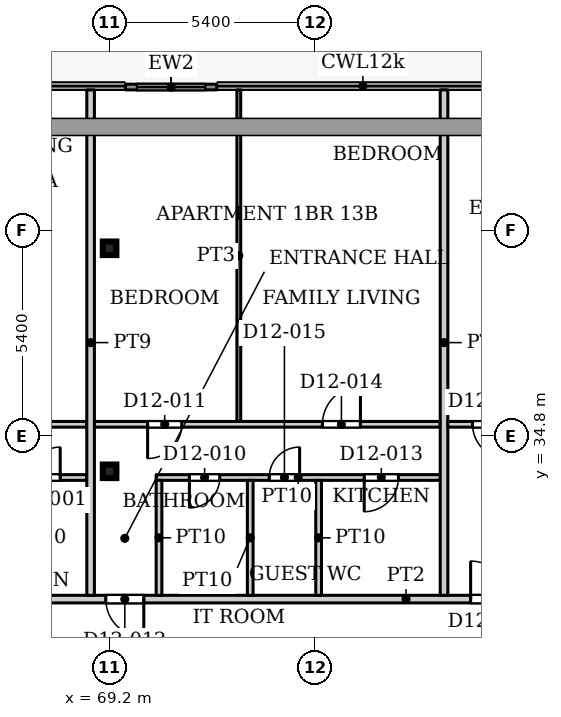
"""IFC4 building model, lengths in metres.
Left out: names, types, materials, properties, quantities, classifications, styles, units other than length and angle.
Written with IfcOpenShell. Run it as: python <this file> out.ifc"""

import sys

from ifc_helpers import new_model, si_unit, direction, frame, frame_2d, origin, origin_2d, place, context, subcontext, project, spatial, rectangle, hollow_rectangle, extrude, source, transform, mapped, element, fill, save


model = new_model("IFC4")
c1 = context("Model", 3, precision=1e-05, world=origin(), true_north=direction((0.0, 1.0)))
c2 = subcontext(c1, "Body", "Model", "MODEL_VIEW")
j1 = project(units=[si_unit("LENGTHUNIT", "METRE"), si_unit("PLANEANGLEUNIT", "RADIAN")], contexts=[c1])
p1 = place(None, origin())
s1 = spatial("IfcSite", under=j1, at=p1, CompositionType="ELEMENT")
p2 = place(p1, origin())
s2 = spatial("IfcBuilding", under=s1, at=p2, CompositionType="ELEMENT")
p3 = place(p2, frame((0.0, 0.0, 57.8)))
s3 = spatial("IfcBuildingStorey", under=s2, at=p3, CompositionType="ELEMENT", Elevation=57.8)
for number, where, z_axis, x_axis in (
    (1, (69.2, 33.863, 0.0), (0.0, 0.0, 1.0), (1.0, 0.0, 0.0)),
    (2, (69.2, 39.732, 0.0), (0.0, 0.0, 1.0), (1.0, 0.0, 0.0)),
):
    element("IfcColumn", number, at=place(p3, frame(where, z_axis=z_axis, x_axis=x_axis)), inside=s3, PredefinedType="COLUMN", context=c2, shape_type="SweptSolid", body=[
        extrude(hollow_rectangle(XDim=0.356, YDim=0.356, WallThickness=0.016, InnerFilletRadius=0.016, OuterFilletRadius=0.032, at=origin_2d()), origin(), (0.0, 0.0, 1.0), 3.9),
    ])
p4 = place(p3, frame((69.618, 43.975, 0.0), z_axis=(0.0, 0.0, 1.0), x_axis=(1.0, 0.0, 0.0)))
e3 = element("IfcWall", 3, at=p4, inside=s3, PredefinedType="SOLIDWALL", context=c2, shape_type="SweptSolid", body=[
    extrude(rectangle(XDim=2.4, YDim=0.15, at=frame_2d((1.2, 0.0))), origin(), (0.0, 0.0, 1.0), 3.75),
])
p5 = place(p4, frame((0.3, 0.0, 0.0)))
e4 = element("IfcOpeningElement", 4, at=p5, cuts=e3, PredefinedType="OPENING", context=c2, shape_type="SweptSolid", body=[
    extrude(rectangle(XDim=1.8, YDim=2.4, at=frame_2d((0.9, 1.2))), frame((0.0, 0.085, 0.0), z_axis=(0.0, -1.0, 0.0), x_axis=(1.0, 0.0, 0.0)), (0.0, 0.0, 1.0), 0.17),
])
p6 = place(p3, frame((55.9, 30.5, 0.0), z_axis=(0.0, 0.0, 1.0), x_axis=(1.0, 0.0, 0.0)))
e5 = element("IfcWall", 5, at=p6, inside=s3, PredefinedType="PARTITIONING", context=c2, shape_type="SweptSolid", body=[
    extrude(rectangle(XDim=42.2, YDim=0.2, at=frame_2d((21.1, 0.0))), origin(), (0.0, 0.0, 1.0), 3.6),
])
p7 = place(p6, frame((0.6, 0.0, 0.0)))
e6 = element("IfcOpeningElement", 6, at=p7, cuts=e5, PredefinedType="OPENING", context=c2, shape_type="SweptSolid", body=[
    extrude(rectangle(XDim=1.0, YDim=2.1, at=frame_2d((0.5, 1.05))), frame((0.0, 0.11, 0.0), z_axis=(0.0, -1.0, 0.0), x_axis=(1.0, 0.0, 0.0)), (0.0, 0.0, 1.0), 0.22),
])
p8 = place(p6, frame((13.2, 0.0, 0.0)))
e7 = element("IfcOpeningElement", 7, at=p8, cuts=e5, PredefinedType="OPENING", context=c2, shape_type="SweptSolid", body=[
    extrude(rectangle(XDim=1.0, YDim=2.1, at=frame_2d((0.5, 1.05))), frame((0.0, 0.11, 0.0), z_axis=(0.0, -1.0, 0.0), x_axis=(1.0, 0.0, 0.0)), (0.0, 0.0, 1.0), 0.22),
])
p9 = place(p6, frame((22.8, 0.0, 0.0)))
e8 = element("IfcOpeningElement", 8, at=p9, cuts=e5, PredefinedType="OPENING", context=c2, shape_type="SweptSolid", body=[
    extrude(rectangle(XDim=1.0, YDim=2.1, at=frame_2d((0.5, 1.05))), frame((0.0, 0.11, 0.0), z_axis=(0.0, -1.0, 0.0), x_axis=(1.0, 0.0, 0.0)), (0.0, 0.0, 1.0), 0.22),
])
p10 = place(p6, frame((34.65, 0.0, 0.0)))
e9 = element("IfcOpeningElement", 9, at=p10, cuts=e5, PredefinedType="OPENING", context=c2, shape_type="SweptSolid", body=[
    extrude(rectangle(XDim=1.0, YDim=2.1, at=frame_2d((0.5, 1.05))), frame((0.0, 0.11, 0.0), z_axis=(0.0, -1.0, 0.0), x_axis=(1.0, 0.0, 0.0)), (0.0, 0.0, 1.0), 0.22),
])
p11 = place(p3, frame((55.9, 35.1, 0.0), z_axis=(0.0, 0.0, 1.0), x_axis=(1.0, 0.0, 0.0)))
e10 = element("IfcWall", 10, at=p11, inside=s3, PredefinedType="PARTITIONING", context=c2, shape_type="SweptSolid", body=[
    extrude(rectangle(XDim=12.7, YDim=0.15, at=frame_2d((6.35, 0.0))), origin(), (0.0, 0.0, 1.0), 3.6),
])
p12 = place(p11, frame((1.25, 0.0, 0.0)))
e11 = element("IfcOpeningElement", 11, at=p12, cuts=e10, PredefinedType="OPENING", context=c2, shape_type="SweptSolid", body=[
    extrude(rectangle(XDim=0.9, YDim=2.1, at=frame_2d((0.45, 1.05))), frame((0.0, 0.085, 0.0), z_axis=(0.0, -1.0, 0.0), x_axis=(1.0, 0.0, 0.0)), (0.0, 0.0, 1.0), 0.17),
])
p13 = place(p11, frame((9.75, 0.0, 0.0)))
e12 = element("IfcOpeningElement", 12, at=p13, cuts=e10, PredefinedType="OPENING", context=c2, shape_type="SweptSolid", body=[
    extrude(rectangle(XDim=1.0, YDim=2.1, at=frame_2d((0.5, 1.05))), frame((0.0, 0.085, 0.0), z_axis=(0.0, -1.0, 0.0), x_axis=(1.0, 0.0, 0.0)), (0.0, 0.0, 1.0), 0.17),
])
p14 = place(p11, frame((4.1, 0.0, 0.0)))
e13 = element("IfcOpeningElement", 13, at=p14, cuts=e10, PredefinedType="OPENING", context=c2, shape_type="SweptSolid", body=[
    extrude(rectangle(XDim=0.9, YDim=2.1, at=frame_2d((0.45, 1.05))), frame((0.0, 0.085, 0.0), z_axis=(0.0, -1.0, 0.0), x_axis=(1.0, 0.0, 0.0)), (0.0, 0.0, 1.0), 0.17),
])
p15 = place(p3, frame((58.15, 33.7, 0.0), z_axis=(0.0, 0.0, 1.0), x_axis=(1.0, 0.0, 0.0)))
e14 = element("IfcWall", 14, at=p15, inside=s3, PredefinedType="PARTITIONING", context=c2, shape_type="SweptSolid", body=[
    extrude(rectangle(XDim=10.45, YDim=0.15, at=frame_2d((5.225, 0.0))), origin(), (0.0, 0.0, 1.0), 3.6),
])
p16 = place(p15, frame((8.95, 0.0, 0.0)))
e15 = element("IfcOpeningElement", 15, at=p16, cuts=e14, PredefinedType="OPENING", context=c2, shape_type="SweptSolid", body=[
    extrude(rectangle(XDim=0.8, YDim=2.1, at=frame_2d((0.4, 1.05))), frame((0.0, 0.085, 0.0), z_axis=(0.0, -1.0, 0.0), x_axis=(1.0, 0.0, 0.0)), (0.0, 0.0, 1.0), 0.17),
])
p17 = place(p15, frame((6.55, 0.0, 0.0)))
e16 = element("IfcOpeningElement", 16, at=p17, cuts=e14, PredefinedType="OPENING", context=c2, shape_type="SweptSolid", body=[
    extrude(rectangle(XDim=0.8, YDim=2.1, at=frame_2d((0.4, 1.05))), frame((0.0, 0.085, 0.0), z_axis=(0.0, -1.0, 0.0), x_axis=(1.0, 0.0, 0.0)), (0.0, 0.0, 1.0), 0.17),
])
p18 = place(p15, frame((1.55, 0.0, 0.0)))
e17 = element("IfcOpeningElement", 17, at=p18, cuts=e14, PredefinedType="OPENING", context=c2, shape_type="SweptSolid", body=[
    extrude(rectangle(XDim=0.9, YDim=2.1, at=frame_2d((0.45, 1.05))), frame((0.0, 0.085, 0.0), z_axis=(0.0, -1.0, 0.0), x_axis=(1.0, 0.0, 0.0)), (0.0, 0.0, 1.0), 0.17),
])
p19 = place(p15, frame((4.45, 0.0, 0.0)))
e18 = element("IfcOpeningElement", 18, at=p19, cuts=e14, PredefinedType="OPENING", context=c2, shape_type="SweptSolid", body=[
    extrude(rectangle(XDim=0.8, YDim=2.1, at=frame_2d((0.4, 1.05))), frame((0.0, 0.085, 0.0), z_axis=(0.0, -1.0, 0.0), x_axis=(1.0, 0.0, 0.0)), (0.0, 0.0, 1.0), 0.17),
])
p20 = place(p3, frame((68.7, 30.6, 0.0), z_axis=(0.0, 0.0, 1.0), x_axis=(0.0, 1.0, 0.0)))
e19 = element("IfcWall", 19, at=p20, inside=s3, PredefinedType="PARTITIONING", context=c2, shape_type="SweptSolid", body=[
    extrude(rectangle(XDim=13.3, YDim=0.2, at=frame_2d((6.65, 0.0))), origin(), (0.0, 0.0, 1.0), 3.6),
])
p21 = place(p3, frame((68.8, 35.1, 0.0), z_axis=(0.0, 0.0, 1.0), x_axis=(1.0, 0.0, 0.0)))
e20 = element("IfcWall", 20, at=p21, inside=s3, PredefinedType="PARTITIONING", context=c2, shape_type="SweptSolid", body=[
    extrude(rectangle(XDim=9.1, YDim=0.15, at=frame_2d((4.55, 0.0))), origin(), (0.0, 0.0, 1.0), 3.6),
])
p22 = place(p21, frame((1.4, 0.0, 0.0)))
e21 = element("IfcOpeningElement", 21, at=p22, cuts=e20, PredefinedType="OPENING", context=c2, shape_type="SweptSolid", body=[
    extrude(rectangle(XDim=0.9, YDim=2.1, at=frame_2d((0.45, 1.05))), frame((0.0, 0.085, 0.0), z_axis=(0.0, -1.0, 0.0), x_axis=(1.0, 0.0, 0.0)), (0.0, 0.0, 1.0), 0.17),
])
p23 = place(p21, frame((6.0, 0.0, 0.0)))
e22 = element("IfcOpeningElement", 22, at=p23, cuts=e20, PredefinedType="OPENING", context=c2, shape_type="SweptSolid", body=[
    extrude(rectangle(XDim=1.0, YDim=2.1, at=frame_2d((0.5, 1.05))), frame((0.0, 0.085, 0.0), z_axis=(0.0, -1.0, 0.0), x_axis=(1.0, 0.0, 0.0)), (0.0, 0.0, 1.0), 0.17),
])
p24 = place(p3, frame((70.425, 33.7, 0.0), z_axis=(0.0, 0.0, 1.0), x_axis=(1.0, 0.0, 0.0)))
e23 = element("IfcWall", 23, at=p24, inside=s3, PredefinedType="PARTITIONING", context=c2, shape_type="SweptSolid", body=[
    extrude(rectangle(XDim=7.475, YDim=0.15, at=frame_2d((3.737, 0.0))), origin(), (0.0, 0.0, 1.0), 3.6),
])
p25 = place(p24, frame((0.875, 0.0, 0.0)))
e24 = element("IfcOpeningElement", 24, at=p25, cuts=e23, PredefinedType="OPENING", context=c2, shape_type="SweptSolid", body=[
    extrude(rectangle(XDim=0.8, YDim=2.1, at=frame_2d((0.4, 1.05))), frame((0.0, 0.085, 0.0), z_axis=(0.0, -1.0, 0.0), x_axis=(1.0, 0.0, 0.0)), (0.0, 0.0, 1.0), 0.17),
])
p26 = place(p24, frame((5.475, 0.0, 0.0)))
e25 = element("IfcOpeningElement", 25, at=p26, cuts=e23, PredefinedType="OPENING", context=c2, shape_type="SweptSolid", body=[
    extrude(rectangle(XDim=0.9, YDim=2.1, at=frame_2d((0.45, 1.05))), frame((0.0, 0.085, 0.0), z_axis=(0.0, -1.0, 0.0), x_axis=(1.0, 0.0, 0.0)), (0.0, 0.0, 1.0), 0.17),
])
p27 = place(p24, frame((2.975, 0.0, 0.0)))
e26 = element("IfcOpeningElement", 26, at=p27, cuts=e23, PredefinedType="OPENING", context=c2, shape_type="SweptSolid", body=[
    extrude(rectangle(XDim=0.8, YDim=2.1, at=frame_2d((0.4, 1.05))), frame((0.0, 0.085, 0.0), z_axis=(0.0, -1.0, 0.0), x_axis=(1.0, 0.0, 0.0)), (0.0, 0.0, 1.0), 0.17),
])
p28 = place(p3, frame((70.5, 30.6, 0.0), z_axis=(0.0, 0.0, 1.0), x_axis=(0.0, 1.0, 0.0)))
e27 = element("IfcWall", 27, at=p28, inside=s3, PredefinedType="PARTITIONING", context=c2, shape_type="SweptSolid", body=[
    extrude(rectangle(XDim=3.025, YDim=0.15, at=frame_2d((1.512, 0.0))), origin(), (0.0, 0.0, 1.0), 3.6),
])
p29 = place(p3, frame((72.6, 35.175, 0.0), z_axis=(0.0, 0.0, 1.0), x_axis=(0.0, 1.0, 0.0)))
e28 = element("IfcWall", 28, at=p29, inside=s3, PredefinedType="PARTITIONING", context=c2, shape_type="SweptSolid", body=[
    extrude(rectangle(XDim=8.725, YDim=0.1, at=frame_2d((4.362, 0.0))), origin(), (0.0, 0.0, 1.0), 3.6),
])
for number, where, z_axis, x_axis in (
    (29, (72.9, 30.6, 0.0), (0.0, 0.0, 1.0), (0.0, 1.0, 0.0)),
    (30, (74.7, 30.6, 0.0), (0.0, 0.0, 1.0), (0.0, 1.0, 0.0)),
):
    element("IfcWall", number, at=place(p3, frame(where, z_axis=z_axis, x_axis=x_axis)), inside=s3, PredefinedType="PARTITIONING", context=c2, shape_type="SweptSolid", body=[
        extrude(rectangle(XDim=3.025, YDim=0.15, at=frame_2d((1.512, 0.0))), origin(), (0.0, 0.0, 1.0), 3.6),
    ])
p30 = place(p3, frame((78.0, 30.6, 0.0), z_axis=(0.0, 0.0, 1.0), x_axis=(0.0, 1.0, 0.0)))
e31 = element("IfcWall", 31, at=p30, inside=s3, PredefinedType="PARTITIONING", context=c2, shape_type="SweptSolid", body=[
    extrude(rectangle(XDim=13.3, YDim=0.2, at=frame_2d((6.65, 0.0))), origin(), (0.0, 0.0, 1.0), 3.6),
])
p31 = place(p3, frame((78.1, 35.1, 0.0), z_axis=(0.0, 0.0, 1.0), x_axis=(1.0, 0.0, 0.0)))
e32 = element("IfcWall", 32, at=p31, inside=s3, PredefinedType="PARTITIONING", context=c2, shape_type="SweptSolid", body=[
    extrude(rectangle(XDim=11.8, YDim=0.15, at=frame_2d((5.9, 0.0))), origin(), (0.0, 0.0, 1.0), 3.6),
])
p32 = place(p31, frame((0.65, 0.0, 0.0)))
e33 = element("IfcOpeningElement", 33, at=p32, cuts=e32, PredefinedType="OPENING", context=c2, shape_type="SweptSolid", body=[
    extrude(rectangle(XDim=0.9, YDim=2.1, at=frame_2d((0.45, 1.05))), frame((0.0, 0.085, 0.0), z_axis=(0.0, -1.0, 0.0), x_axis=(1.0, 0.0, 0.0)), (0.0, 0.0, 1.0), 0.17),
])
p33 = place(p31, frame((8.85, 0.0, 0.0)))
e34 = element("IfcOpeningElement", 34, at=p33, cuts=e32, PredefinedType="OPENING", context=c2, shape_type="SweptSolid", body=[
    extrude(rectangle(XDim=1.0, YDim=2.1, at=frame_2d((0.5, 1.05))), frame((0.0, 0.085, 0.0), z_axis=(0.0, -1.0, 0.0), x_axis=(1.0, 0.0, 0.0)), (0.0, 0.0, 1.0), 0.17),
])
p34 = place(p31, frame((5.15, 0.0, 0.0)))
e35 = element("IfcOpeningElement", 35, at=p34, cuts=e32, PredefinedType="OPENING", context=c2, shape_type="SweptSolid", body=[
    extrude(rectangle(XDim=0.9, YDim=2.1, at=frame_2d((0.45, 1.05))), frame((0.0, 0.085, 0.0), z_axis=(0.0, -1.0, 0.0), x_axis=(1.0, 0.0, 0.0)), (0.0, 0.0, 1.0), 0.17),
])
m1 = source(origin(), c2, "Body", "SweptSolid", [
    extrude(rectangle(XDim=1.8, YDim=2.4, at=frame_2d((0.9, 1.2))), frame((0.0, 0.025, 0.0), z_axis=(0.0, -1.0, 0.0), x_axis=(1.0, 0.0, 0.0)), (0.0, 0.0, 1.0), 0.05),
])
p35 = place(p5, origin())
e36 = element("IfcDoor", 36, at=p35, inside=s3, OperationType="SLIDING_TO_LEFT", PredefinedType="DOOR", context=c2, shape_type="MappedRepresentation", body=[
    mapped(m1, transform((0.0, 0.0, 0.0), x_axis=(1.0, 0.0, 0.0), y_axis=(0.0, 1.0, 0.0), z_axis=(0.0, 0.0, 1.0), scale=1.0)),
])
fill(e4, e36)
m2 = source(origin(), c2, "Body", "SweptSolid", [
    extrude(rectangle(XDim=0.8, YDim=2.1, at=frame_2d((0.4, 1.05))), frame((0.0, 0.025, 0.0), z_axis=(0.0, -1.0, 0.0), x_axis=(1.0, 0.0, 0.0)), (0.0, 0.0, 1.0), 0.05),
])
p36 = place(p16, origin())
e37 = element("IfcDoor", 37, at=p36, inside=s3, OperationType="SINGLE_SWING_LEFT", PredefinedType="DOOR", context=c2, shape_type="MappedRepresentation", body=[
    mapped(m2, transform((0.0, 0.0, 0.0), x_axis=(1.0, 0.0, 0.0), y_axis=(0.0, 1.0, 0.0), z_axis=(0.0, 0.0, 1.0), scale=1.0)),
])
fill(e15, e37)
p37 = place(p25, origin())
e38 = element("IfcDoor", 38, at=p37, inside=s3, OperationType="SINGLE_SWING_RIGHT", PredefinedType="DOOR", context=c2, shape_type="MappedRepresentation", body=[
    mapped(m2, transform((0.0, 0.0, 0.0), x_axis=(1.0, 0.0, 0.0), y_axis=(0.0, 1.0, 0.0), z_axis=(0.0, 0.0, 1.0), scale=1.0)),
])
fill(e24, e38)
m3 = source(origin(), c2, "Body", "SweptSolid", [
    extrude(rectangle(XDim=0.9, YDim=2.1, at=frame_2d((0.45, 1.05))), frame((0.0, 0.025, 0.0), z_axis=(0.0, -1.0, 0.0), x_axis=(1.0, 0.0, 0.0)), (0.0, 0.0, 1.0), 0.05),
])
p38 = place(p22, origin())
e39 = element("IfcDoor", 39, at=p38, inside=s3, OperationType="SINGLE_SWING_RIGHT", PredefinedType="DOOR", context=c2, shape_type="MappedRepresentation", body=[
    mapped(m3, transform((0.0, 0.0, 0.0), x_axis=(1.0, 0.0, 0.0), y_axis=(0.0, 1.0, 0.0), z_axis=(0.0, 0.0, 1.0), scale=1.0)),
])
fill(e21, e39)
m4 = source(origin(), c2, "Body", "SweptSolid", [
    extrude(rectangle(XDim=1.0, YDim=2.1, at=frame_2d((0.5, 1.05))), frame((0.0, 0.025, 0.0), z_axis=(0.0, -1.0, 0.0), x_axis=(1.0, 0.0, 0.0)), (0.0, 0.0, 1.0), 0.05),
])
p39 = place(p8, origin())
e40 = element("IfcDoor", 40, at=p39, inside=s3, OperationType="SINGLE_SWING_RIGHT", PredefinedType="DOOR", context=c2, shape_type="MappedRepresentation", body=[
    mapped(m4, transform((0.0, 0.0, 0.0), x_axis=(1.0, 0.0, 0.0), y_axis=(0.0, 1.0, 0.0), z_axis=(0.0, 0.0, 1.0), scale=1.0)),
])
fill(e7, e40)
p40 = place(p26, origin())
e41 = element("IfcDoor", 41, at=p40, inside=s3, OperationType="SINGLE_SWING_RIGHT", PredefinedType="DOOR", context=c2, shape_type="MappedRepresentation", body=[
    mapped(m3, transform((0.0, 0.0, 0.0), x_axis=(1.0, 0.0, 0.0), y_axis=(0.0, 1.0, 0.0), z_axis=(0.0, 0.0, 1.0), scale=1.0)),
])
fill(e25, e41)
m5 = source(origin(), c2, "Body", "SweptSolid", [
    extrude(rectangle(XDim=1.0, YDim=2.1, at=frame_2d((0.5, 1.05))), frame((0.0, 0.025, 0.0), z_axis=(0.0, -1.0, 0.0), x_axis=(1.0, 0.0, 0.0)), (0.0, 0.0, 1.0), 0.05),
])
p41 = place(p23, origin())
e42 = element("IfcDoor", 42, at=p41, inside=s3, OperationType="SINGLE_SWING_LEFT", PredefinedType="DOOR", context=c2, shape_type="MappedRepresentation", body=[
    mapped(m5, transform((0.0, 0.0, 0.0), x_axis=(1.0, 0.0, 0.0), y_axis=(0.0, 1.0, 0.0), z_axis=(0.0, 0.0, 1.0), scale=1.0)),
])
fill(e22, e42)
p42 = place(p27, origin())
e43 = element("IfcDoor", 43, at=p42, inside=s3, OperationType="SINGLE_SWING_LEFT", PredefinedType="DOOR", context=c2, shape_type="MappedRepresentation", body=[
    mapped(m2, transform((0.0, 0.0, 0.0), x_axis=(1.0, 0.0, 0.0), y_axis=(0.0, 1.0, 0.0), z_axis=(0.0, 0.0, 1.0), scale=1.0)),
])
fill(e26, e43)
p43 = place(p32, origin())
e44 = element("IfcDoor", 44, at=p43, inside=s3, OperationType="SINGLE_SWING_RIGHT", PredefinedType="DOOR", context=c2, shape_type="MappedRepresentation", body=[
    mapped(m3, transform((0.0, 0.0, 0.0), x_axis=(1.0, 0.0, 0.0), y_axis=(0.0, 1.0, 0.0), z_axis=(0.0, 0.0, 1.0), scale=1.0)),
])
fill(e33, e44)
p44 = place(p9, origin())
e45 = element("IfcDoor", 45, at=p44, inside=s3, OperationType="SINGLE_SWING_LEFT", PredefinedType="DOOR", context=c2, shape_type="MappedRepresentation", body=[
    mapped(m4, transform((0.0, 0.0, 0.0), x_axis=(1.0, 0.0, 0.0), y_axis=(0.0, 1.0, 0.0), z_axis=(0.0, 0.0, 1.0), scale=1.0)),
])
fill(e8, e45)
save(model, sys.argv[1])
